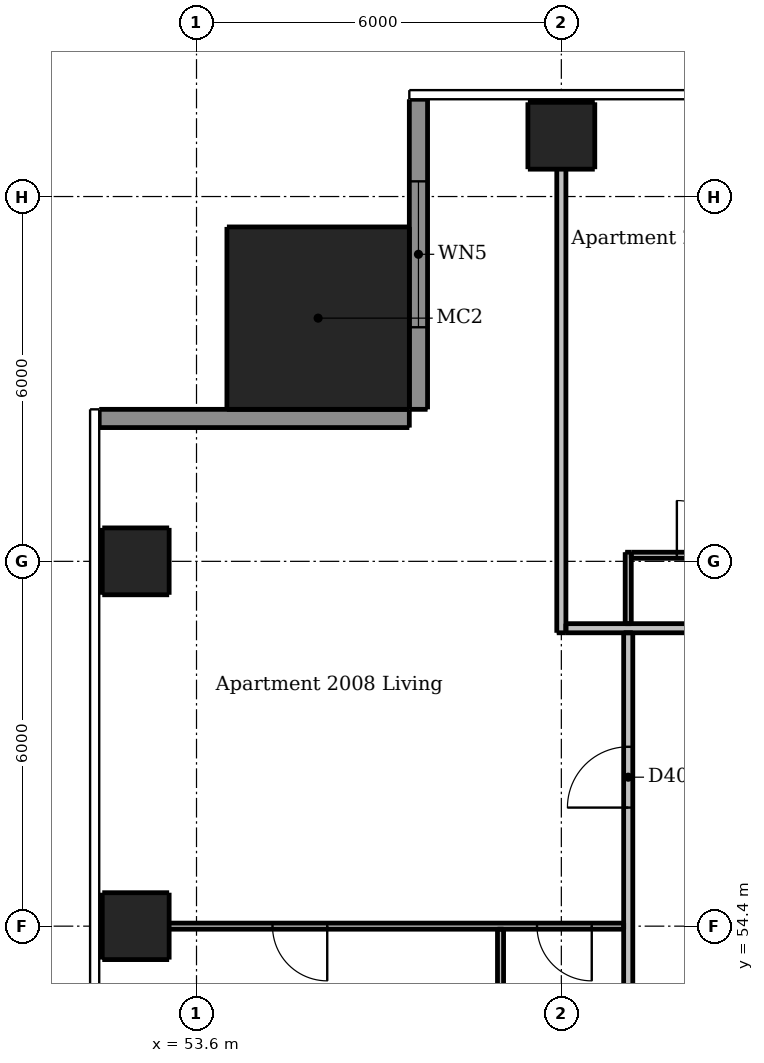
"""IFC4 building model, lengths in metres.
Left out: names, types, materials, properties, quantities, classifications, styles, units other than length and angle.
Written with IfcOpenShell. Run it as: python <this file> out.ifc"""

import sys

from ifc_helpers import new_model, si_unit, direction, frame, frame_2d, origin, origin_2d, place, context, subcontext, project, spatial, rectangle, extrude, element, fill, save


model = new_model("IFC4")
c1 = context("Model", 3, precision=1e-05, world=origin(), true_north=direction((0.0, 1.0)))
c2 = subcontext(c1, "Body", "Model", "MODEL_VIEW")
j1 = project(units=[si_unit("LENGTHUNIT", "METRE"), si_unit("PLANEANGLEUNIT", "RADIAN")], contexts=[c1])
p1 = place(None, origin())
s1 = spatial("IfcSite", under=j1, at=p1, CompositionType="ELEMENT")
p2 = place(p1, origin())
s2 = spatial("IfcBuilding", under=s1, at=p2, CompositionType="ELEMENT")
p3 = place(p2, frame((0.0, 0.0, 78.7)))
s3 = spatial("IfcBuildingStorey", under=s2, at=p3, CompositionType="ELEMENT", Elevation=78.7)
for number, where, z_axis, x_axis in (
    (1, (59.6, 67.4, 0.0), (0.0, 0.0, 1.0), (1.0, 0.0, 0.0)),
    (2, (52.6, 54.4, 0.0), (0.0, 0.0, 1.0), (1.0, 0.0, 0.0)),
    (3, (52.6, 60.4, 0.0), (0.0, 0.0, 1.0), (1.0, 0.0, 0.0)),
):
    element("IfcColumn", number, at=place(p3, frame(where, z_axis=z_axis, x_axis=x_axis)), inside=s3, PredefinedType="COLUMN", context=c2, shape_type="SweptSolid", body=[
        extrude(rectangle(XDim=1.1, YDim=1.1, at=origin_2d()), origin(), (0.0, 0.0, 1.0), 3.05),
    ])
p4 = place(p3, frame((55.6, 64.4, 0.0), z_axis=(0.0, 0.0, 1.0), x_axis=(1.0, 0.0, 0.0)))
e4 = element("IfcColumn", 4, at=p4, inside=s3, PredefinedType="COLUMN", context=c2, shape_type="SweptSolid", body=[
    extrude(rectangle(XDim=3.0, YDim=3.0, at=origin_2d()), origin(), (0.0, 0.0, 1.0), 3.3),
])
p5 = place(p3, frame((57.25, 68.0, 0.0), z_axis=(0.0, 0.0, 1.0), x_axis=(0.0, -1.0, 0.0)))
e5 = element("IfcWall", 5, at=p5, inside=s3, PredefinedType="SOLIDWALL", context=c2, shape_type="SweptSolid", body=[
    extrude(rectangle(XDim=5.1, YDim=0.3, at=frame_2d((2.55, 0.0))), origin(), (0.0, 0.0, 1.0), 3.05),
])
p6 = place(p5, frame((1.35, 0.0, 0.15)))
e6 = element("IfcOpeningElement", 6, at=p6, cuts=e5, PredefinedType="OPENING", context=c2, shape_type="SweptSolid", body=[
    extrude(rectangle(XDim=2.4, YDim=2.1, at=frame_2d((1.2, 1.05))), frame((0.0, 0.16, 0.0), z_axis=(0.0, -1.0, 0.0), x_axis=(1.0, 0.0, 0.0)), (0.0, 0.0, 1.0), 0.32),
])
p7 = place(p3, frame((57.1, 62.75, 0.0), z_axis=(0.0, 0.0, 1.0), x_axis=(-1.0, 0.0, 0.0)))
e7 = element("IfcWall", 7, at=p7, inside=s3, PredefinedType="SOLIDWALL", context=c2, shape_type="SweptSolid", body=[
    extrude(rectangle(XDim=5.1, YDim=0.3, at=frame_2d((2.55, 0.0))), origin(), (0.0, 0.0, 1.0), 3.05),
])
p8 = place(p3, frame((58.6, 54.35, 0.0), z_axis=(0.0, 0.0, 1.0), x_axis=(0.0, -1.0, 0.0)))
e8 = element("IfcWall", 8, at=p8, inside=s3, PredefinedType="PARTITIONING", context=c2, shape_type="SweptSolid", body=[
    extrude(rectangle(XDim=5.875, YDim=0.1, at=frame_2d((2.938, 0.0))), origin(), (0.0, 0.0, 1.0), 3.05),
])
p9 = place(p8, frame((3.75, 0.0, 0.0)))
e9 = element("IfcOpeningElement", 9, at=p9, cuts=e8, PredefinedType="OPENING", context=c2, shape_type="SweptSolid", body=[
    extrude(rectangle(XDim=0.8, YDim=2.1, at=frame_2d((0.4, 1.05))), frame((0.0, 0.06, 0.0), z_axis=(0.0, -1.0, 0.0), x_axis=(1.0, 0.0, 0.0)), (0.0, 0.0, 1.0), 0.12),
])
p10 = place(p3, frame((60.7, 59.375, 0.0), z_axis=(0.0, 0.0, 1.0), x_axis=(0.0, 1.0, 0.0)))
e10 = element("IfcWall", 10, at=p10, inside=s3, PredefinedType="PARTITIONING", context=c2, shape_type="SweptSolid", body=[
    extrude(rectangle(XDim=1.175, YDim=0.1, at=frame_2d((0.587, 0.0))), origin(), (0.0, 0.0, 1.0), 3.05),
])
p11 = place(p3, frame((60.75, 60.5, 0.0), z_axis=(0.0, 0.0, 1.0), x_axis=(1.0, 0.0, 0.0)))
e11 = element("IfcWall", 11, at=p11, inside=s3, PredefinedType="PARTITIONING", context=c2, shape_type="SweptSolid", body=[
    extrude(rectangle(XDim=16.775, YDim=0.1, at=frame_2d((8.387, 0.0))), origin(), (0.0, 0.0, 1.0), 3.05),
])
p12 = place(p11, frame((8.9, 0.0, 0.0)))
e12 = element("IfcOpeningElement", 12, at=p12, cuts=e11, PredefinedType="OPENING", context=c2, shape_type="SweptSolid", body=[
    extrude(rectangle(XDim=0.9, YDim=2.1, at=frame_2d((0.45, 1.05))), frame((0.0, 0.06, 0.0), z_axis=(0.0, -1.0, 0.0), x_axis=(1.0, 0.0, 0.0)), (0.0, 0.0, 1.0), 0.12),
])
p13 = place(p11, frame((14.9, 0.0, 0.0)))
e13 = element("IfcOpeningElement", 13, at=p13, cuts=e11, PredefinedType="OPENING", context=c2, shape_type="SweptSolid", body=[
    extrude(rectangle(XDim=0.9, YDim=2.1, at=frame_2d((0.45, 1.05))), frame((0.0, 0.06, 0.0), z_axis=(0.0, -1.0, 0.0), x_axis=(1.0, 0.0, 0.0)), (0.0, 0.0, 1.0), 0.12),
])
p14 = place(p11, frame((12.5, 0.0, 0.0)))
e14 = element("IfcOpeningElement", 14, at=p14, cuts=e11, PredefinedType="OPENING", context=c2, shape_type="SweptSolid", body=[
    extrude(rectangle(XDim=0.9, YDim=2.1, at=frame_2d((0.45, 1.05))), frame((0.0, 0.06, 0.0), z_axis=(0.0, -1.0, 0.0), x_axis=(1.0, 0.0, 0.0)), (0.0, 0.0, 1.0), 0.12),
])
p15 = place(p11, frame((5.35, 0.0, 0.0)))
e15 = element("IfcOpeningElement", 15, at=p15, cuts=e11, PredefinedType="OPENING", context=c2, shape_type="SweptSolid", body=[
    extrude(rectangle(XDim=0.8, YDim=2.1, at=frame_2d((0.4, 1.05))), frame((0.0, 0.06, 0.0), z_axis=(0.0, -1.0, 0.0), x_axis=(1.0, 0.0, 0.0)), (0.0, 0.0, 1.0), 0.12),
])
p16 = place(p11, frame((0.75, 0.0, 0.0)))
e16 = element("IfcOpeningElement", 16, at=p16, cuts=e11, PredefinedType="OPENING", context=c2, shape_type="SweptSolid", body=[
    extrude(rectangle(XDim=0.9, YDim=2.1, at=frame_2d((0.45, 1.05))), frame((0.0, 0.06, 0.0), z_axis=(0.0, -1.0, 0.0), x_axis=(1.0, 0.0, 0.0)), (0.0, 0.0, 1.0), 0.12),
])
p17 = place(p11, frame((3.25, 0.0, 0.0)))
e17 = element("IfcOpeningElement", 17, at=p17, cuts=e11, PredefinedType="OPENING", context=c2, shape_type="SweptSolid", body=[
    extrude(rectangle(XDim=0.8, YDim=2.1, at=frame_2d((0.4, 1.05))), frame((0.0, 0.06, 0.0), z_axis=(0.0, -1.0, 0.0), x_axis=(1.0, 0.0, 0.0)), (0.0, 0.0, 1.0), 0.12),
])
p18 = place(p3, frame((60.625, 54.4, 0.0), z_axis=(0.0, 0.0, 1.0), x_axis=(-1.0, 0.0, 0.0)))
e18 = element("IfcWall", 18, at=p18, inside=s3, PredefinedType="PARTITIONING", context=c2, shape_type="SweptSolid", body=[
    extrude(rectangle(XDim=8.625, YDim=0.1, at=frame_2d((4.312, 0.0))), origin(), (0.0, 0.0, 1.0), 2.516),
])
p19 = place(p18, frame((0.525, 0.0, 0.0)))
e19 = element("IfcOpeningElement", 19, at=p19, cuts=e18, PredefinedType="OPENING", context=c2, shape_type="SweptSolid", body=[
    extrude(rectangle(XDim=0.9, YDim=2.1, at=frame_2d((0.45, 1.05))), frame((0.0, 0.06, 0.0), z_axis=(0.0, -1.0, 0.0), x_axis=(1.0, 0.0, 0.0)), (0.0, 0.0, 1.0), 0.12),
])
p20 = place(p18, frame((4.875, 0.0, 0.0)))
e20 = element("IfcOpeningElement", 20, at=p20, cuts=e18, PredefinedType="OPENING", context=c2, shape_type="SweptSolid", body=[
    extrude(rectangle(XDim=0.9, YDim=2.1, at=frame_2d((0.45, 1.05))), frame((0.0, 0.06, 0.0), z_axis=(0.0, -1.0, 0.0), x_axis=(1.0, 0.0, 0.0)), (0.0, 0.0, 1.0), 0.12),
])
p21 = place(p3, frame((59.6, 59.225, 0.0), z_axis=(0.0, 0.0, 1.0), x_axis=(0.0, 1.0, 0.0)))
e21 = element("IfcWall", 21, at=p21, inside=s3, PredefinedType="PARTITIONING", context=c2, shape_type="SweptSolid", body=[
    extrude(rectangle(XDim=8.775, YDim=0.15, at=frame_2d((4.387, 0.0))), origin(), (0.0, 0.0, 1.0), 2.51),
])
p22 = place(p3, frame((60.7, 30.325, 0.0), z_axis=(0.0, 0.0, 1.0), x_axis=(0.0, 1.0, 0.0)))
e22 = element("IfcWall", 22, at=p22, inside=s3, PredefinedType="PARTITIONING", context=c2, shape_type="SweptSolid", body=[
    extrude(rectangle(XDim=28.9, YDim=0.15, at=frame_2d((14.45, 0.0))), origin(), (0.0, 0.0, 1.0), 3.05),
])
p23 = place(p22, frame((9.225, 0.0, 0.0)))
e23 = element("IfcOpeningElement", 23, at=p23, cuts=e22, PredefinedType="OPENING", context=c2, shape_type="SweptSolid", body=[
    extrude(rectangle(XDim=1.0, YDim=2.1, at=frame_2d((0.5, 1.05))), frame((0.0, 0.085, 0.0), z_axis=(0.0, -1.0, 0.0), x_axis=(1.0, 0.0, 0.0)), (0.0, 0.0, 1.0), 0.17),
])
p24 = place(p22, frame((26.025, 0.0, 0.0)))
e24 = element("IfcOpeningElement", 24, at=p24, cuts=e22, PredefinedType="OPENING", context=c2, shape_type="SweptSolid", body=[
    extrude(rectangle(XDim=1.0, YDim=2.1, at=frame_2d((0.5, 1.05))), frame((0.0, 0.085, 0.0), z_axis=(0.0, -1.0, 0.0), x_axis=(1.0, 0.0, 0.0)), (0.0, 0.0, 1.0), 0.17),
])
p25 = place(p3, frame((59.675, 59.3, 0.0), z_axis=(0.0, 0.0, 1.0), x_axis=(1.0, 0.0, 0.0)))
e25 = element("IfcWall", 25, at=p25, inside=s3, PredefinedType="PARTITIONING", context=c2, shape_type="SweptSolid", body=[
    extrude(rectangle(XDim=28.55, YDim=0.15, at=frame_2d((14.275, 0.0))), origin(), (0.0, 0.0, 1.0), 3.05),
])
p26 = place(p25, frame((8.975, 0.0, 0.0)))
e26 = element("IfcOpeningElement", 26, at=p26, cuts=e25, PredefinedType="OPENING", context=c2, shape_type="SweptSolid", body=[
    extrude(rectangle(XDim=1.0, YDim=2.1, at=frame_2d((0.5, 1.05))), frame((0.0, 0.085, 0.0), z_axis=(0.0, -1.0, 0.0), x_axis=(1.0, 0.0, 0.0)), (0.0, 0.0, 1.0), 0.17),
])
p27 = place(p25, frame((25.775, 0.0, 0.0)))
e27 = element("IfcOpeningElement", 27, at=p27, cuts=e25, PredefinedType="OPENING", context=c2, shape_type="SweptSolid", body=[
    extrude(rectangle(XDim=1.0, YDim=2.1, at=frame_2d((0.5, 1.05))), frame((0.0, 0.085, 0.0), z_axis=(0.0, -1.0, 0.0), x_axis=(1.0, 0.0, 0.0)), (0.0, 0.0, 1.0), 0.17),
])
p28 = place(p6, origin())
e28 = element("IfcWindow", 28, at=p28, inside=s3, PartitioningType="DOUBLE_PANEL_VERTICAL", PredefinedType="WINDOW", context=c2, shape_type="SweptSolid", body=[
    extrude(rectangle(XDim=2.4, YDim=2.1, at=frame_2d((1.2, 1.05))), frame((0.0, 0.03, 0.0), z_axis=(0.0, -1.0, 0.0), x_axis=(1.0, 0.0, 0.0)), (0.0, 0.0, 1.0), 0.06),
])
fill(e6, e28)
p29 = place(p16, origin())
e29 = element("IfcDoor", 29, at=p29, inside=s3, OperationType="SINGLE_SWING_LEFT", PredefinedType="DOOR", context=c2, shape_type="SweptSolid", body=[
    extrude(rectangle(XDim=0.9, YDim=2.1, at=frame_2d((0.45, 1.05))), frame((0.0, 0.025, 0.0), z_axis=(0.0, -1.0, 0.0), x_axis=(1.0, 0.0, 0.0)), (0.0, 0.0, 1.0), 0.05),
])
fill(e16, e29)
p30 = place(p24, origin())
e30 = element("IfcDoor", 30, at=p30, inside=s3, OperationType="SINGLE_SWING_LEFT", PredefinedType="DOOR", context=c2, shape_type="SweptSolid", body=[
    extrude(rectangle(XDim=1.0, YDim=2.1, at=frame_2d((0.5, 1.05))), frame((0.0, 0.025, 0.0), z_axis=(0.0, -1.0, 0.0), x_axis=(1.0, 0.0, 0.0)), (0.0, 0.0, 1.0), 0.05),
])
fill(e24, e30)
p31 = place(p19, origin())
e31 = element("IfcDoor", 31, at=p31, inside=s3, OperationType="SINGLE_SWING_LEFT", PredefinedType="DOOR", context=c2, shape_type="SweptSolid", body=[
    extrude(rectangle(XDim=0.9, YDim=2.1, at=frame_2d((0.45, 1.05))), frame((0.0, 0.025, 0.0), z_axis=(0.0, -1.0, 0.0), x_axis=(1.0, 0.0, 0.0)), (0.0, 0.0, 1.0), 0.05),
])
fill(e19, e31)
p32 = place(p20, origin())
e32 = element("IfcDoor", 32, at=p32, inside=s3, OperationType="SINGLE_SWING_LEFT", PredefinedType="DOOR", context=c2, shape_type="SweptSolid", body=[
    extrude(rectangle(XDim=0.9, YDim=2.1, at=frame_2d((0.45, 1.05))), frame((0.0, 0.025, 0.0), z_axis=(0.0, -1.0, 0.0), x_axis=(1.0, 0.0, 0.0)), (0.0, 0.0, 1.0), 0.05),
])
fill(e20, e32)
save(model, sys.argv[1])
